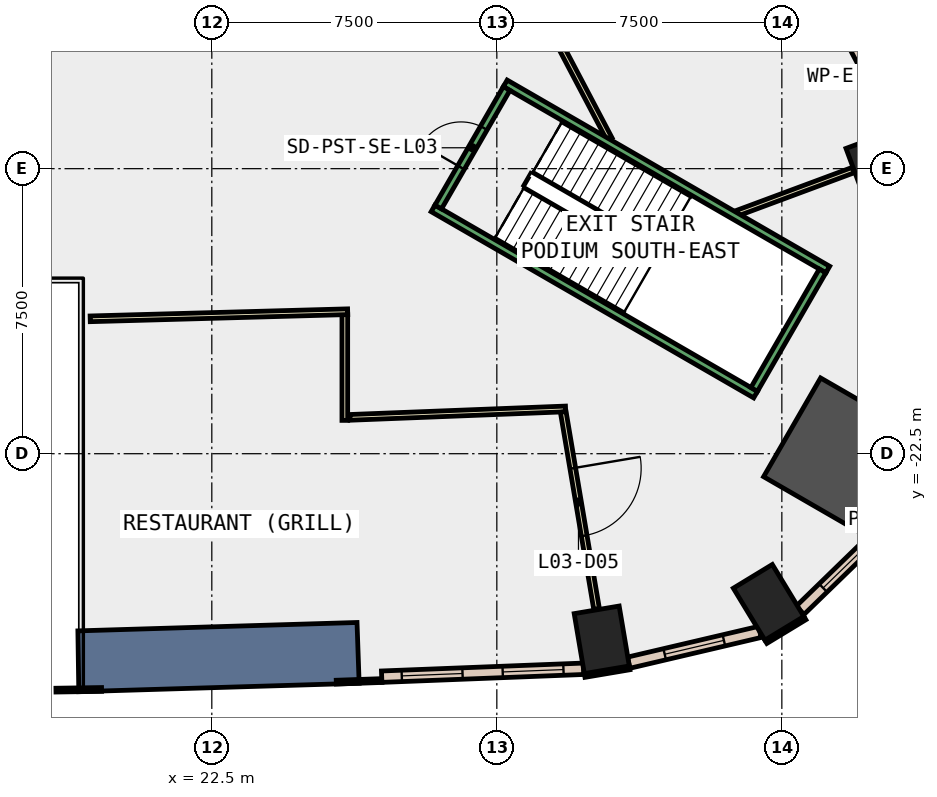
"""IFC4 building model, lengths in metres.
Left out: names, types, materials, properties, quantities, classifications, styles, units other than length and angle.
Written with IfcOpenShell. Run it as: python <this file> out.ifc"""

import sys

from ifc_helpers import new_model, si_unit, direction, frame, frame_2d, origin, origin_2d, place, context, subcontext, project, spatial, polyline, rectangle, outline, extrude, element, fill, save


model = new_model("IFC4")
c1 = context("Model", 3, precision=1e-05, world=origin(), true_north=direction((0.0, 1.0)))
c2 = subcontext(c1, "Body", "Model", "MODEL_VIEW")
j1 = project(units=[si_unit("LENGTHUNIT", "METRE"), si_unit("PLANEANGLEUNIT", "RADIAN")], contexts=[c1])
p1 = place(None, origin())
s1 = spatial("IfcSite", under=j1, at=p1, CompositionType="ELEMENT")
p2 = place(p1, origin())
s2 = spatial("IfcBuilding", under=s1, at=p2, CompositionType="ELEMENT")
p3 = place(p2, frame((0.0, 0.0, 20.0)))
s3 = spatial("IfcBuildingStorey", under=s2, at=p3, CompositionType="ELEMENT", Elevation=20.0)
for number, where, z_axis, x_axis in (
    (1, (32.761, -27.397, -0.45), (0.0, 0.0, 1.0), (0.986, 0.167, 0.0)),
    (2, (37.152, -26.411, -0.45), (0.0, 0.0, 1.0), (0.855, 0.519, 0.0)),
):
    element("IfcColumn", number, at=place(p3, frame(where, z_axis=z_axis, x_axis=x_axis)), inside=s3, PredefinedType="COLUMN", context=c2, shape_type="SweptSolid", body=[
        extrude(rectangle(XDim=1.2, YDim=1.6, at=origin_2d()), origin(), (0.0, 0.0, 1.0), 5.0),
    ])
p4 = place(p3, frame((39.069, -22.556, -0.45), z_axis=(0.0, 0.0, 1.0), x_axis=(-0.866025403784, 0.5, 0.0)))
e3 = element("IfcColumn", 3, at=p4, inside=s3, PredefinedType="COLUMN", context=c2, shape_type="SweptSolid", body=[
    extrude(rectangle(XDim=3.0, YDim=3.0, at=origin_2d()), origin(), (0.0, 0.0, 1.0), 5.0),
])
p5 = place(p3, frame((40.147, -14.751, -0.45), z_axis=(0.0, 0.0, 1.0), x_axis=(-0.348277574304, 0.937391450375, 0.0)))
e4 = element("IfcColumn", 4, at=p5, inside=s3, PredefinedType="COLUMN", context=c2, shape_type="SweptSolid", body=[
    extrude(rectangle(XDim=1.2, YDim=1.6, at=origin_2d()), origin(), (0.0, 0.0, 1.0), 5.0),
])
p6 = place(p3, frame((0.0, 0.0, -0.45)))
e5 = element("IfcWall", 5, at=p6, inside=s3, PredefinedType="SHEAR", context=c2, shape_type="SweptSolid", body=[
    extrude(outline(polyline([(19.0, -28.762), (26.377, -28.54), (26.321, -26.941), (18.976, -27.162), (19.0, -28.762)])), origin(), (0.0, 0.0, 1.0), 5.0),
])
p7 = place(p3, frame((18.399, -28.721, 0.0), z_axis=(0.0, 0.0, 1.0), x_axis=(0.999886724523, 0.015051183404, 0.0)))
e6 = element("IfcWall", 6, at=p7, inside=s3, PredefinedType="STANDARD", context=c2, shape_type="SweptSolid", body=[
    extrude(rectangle(XDim=1.2, YDim=0.1, at=frame_2d((0.6, 0.0))), origin(), (0.0, 0.0, 1.0), 4.55),
])
p8 = place(p3, frame((25.776, -28.511, 0.0), z_axis=(0.0, 0.0, 1.0), x_axis=(0.999387493042, 0.034994838926, 0.0)))
e7 = element("IfcWall", 7, at=p8, inside=s3, PredefinedType="STANDARD", context=c2, shape_type="SweptSolid", body=[
    extrude(rectangle(XDim=1.2, YDim=0.1, at=frame_2d((0.6, 0.0))), origin(), (0.0, 0.0, 1.0), 4.55),
])
p9 = place(p3, frame((32.311, -28.335, 0.0), z_axis=(0.0, 0.0, 1.0), x_axis=(0.986011774526, 0.166675674579, 0.0)))
e8 = element("IfcWall", 8, at=p9, inside=s3, PredefinedType="STANDARD", context=c2, shape_type="SweptSolid", body=[
    extrude(rectangle(XDim=1.2, YDim=0.1, at=frame_2d((0.6, 0.0))), origin(), (0.0, 0.0, 1.0), 4.55),
])
p10 = place(p3, frame((37.08, -27.449, 0.0), z_axis=(0.0, 0.0, 1.0), x_axis=(0.854716608594, 0.519094903649, 0.0)))
e9 = element("IfcWall", 9, at=p10, inside=s3, PredefinedType="STANDARD", context=c2, shape_type="SweptSolid", body=[
    extrude(rectangle(XDim=1.2, YDim=0.1, at=frame_2d((0.6, 0.0))), origin(), (0.0, 0.0, 1.0), 4.55),
])
p11 = place(p3, frame((26.97, -28.367, 0.0), z_axis=(0.0, 0.0, 1.0), x_axis=(0.999234205654, 0.039128023863, 0.0)))
e10 = element("IfcWall", 10, at=p11, inside=s3, PredefinedType="STANDARD", context=c2, shape_type="SweptSolid", body=[
    extrude(rectangle(XDim=5.316, YDim=0.3, at=frame_2d((2.658, 0.0))), origin(), (0.0, 0.0, 1.0), 4.55),
])
p12 = place(p11, frame((0.529, 0.0, 1.0)))
e11 = element("IfcOpeningElement", 11, at=p12, cuts=e10, PredefinedType="OPENING", context=c2, shape_type="SweptSolid", body=[
    extrude(rectangle(XDim=1.6, YDim=3.2, at=frame_2d((0.8, 1.6))), frame((0.0, 0.16, 0.0), z_axis=(0.0, -1.0, 0.0), x_axis=(1.0, 0.0, 0.0)), (0.0, 0.0, 1.0), 0.32),
])
p13 = place(p11, frame((3.187, 0.0, 1.0)))
e12 = element("IfcOpeningElement", 12, at=p13, cuts=e10, PredefinedType="OPENING", context=c2, shape_type="SweptSolid", body=[
    extrude(rectangle(XDim=1.6, YDim=3.2, at=frame_2d((0.8, 1.6))), frame((0.0, 0.16, 0.0), z_axis=(0.0, -1.0, 0.0), x_axis=(1.0, 0.0, 0.0)), (0.0, 0.0, 1.0), 0.32),
])
p14 = place(p3, frame((33.47, -27.999, 0.0), z_axis=(0.0, 0.0, 1.0), x_axis=(0.97357041301, 0.228387063799, 0.0)))
e13 = element("IfcWall", 13, at=p14, inside=s3, PredefinedType="STANDARD", context=c2, shape_type="SweptSolid", body=[
    extrude(rectangle(XDim=3.547, YDim=0.3, at=frame_2d((1.773, 0.0))), origin(), (0.0, 0.0, 1.0), 4.55),
])
p15 = place(p14, frame((0.973, 0.0, 1.0)))
e14 = element("IfcOpeningElement", 14, at=p15, cuts=e13, PredefinedType="OPENING", context=c2, shape_type="SweptSolid", body=[
    extrude(rectangle(XDim=1.6, YDim=3.2, at=frame_2d((0.8, 1.6))), frame((0.0, 0.16, 0.0), z_axis=(0.0, -1.0, 0.0), x_axis=(1.0, 0.0, 0.0)), (0.0, 0.0, 1.0), 0.32),
])
p16 = place(p3, frame((37.98, -26.621, 0.0), z_axis=(0.0, 0.0, 1.0), x_axis=(0.717527250225, 0.696530433782, 0.0)))
e15 = element("IfcWall", 15, at=p16, inside=s3, PredefinedType="STANDARD", context=c2, shape_type="SweptSolid", body=[
    extrude(rectangle(XDim=3.291, YDim=0.3, at=frame_2d((1.645, 0.0))), origin(), (0.0, 0.0, 1.0), 4.55),
])
p17 = place(p16, frame((0.845, 0.0, 1.0)))
e16 = element("IfcOpeningElement", 16, at=p17, cuts=e15, PredefinedType="OPENING", context=c2, shape_type="SweptSolid", body=[
    extrude(rectangle(XDim=1.6, YDim=3.2, at=frame_2d((0.8, 1.6))), frame((0.0, 0.16, 0.0), z_axis=(0.0, -1.0, 0.0), x_axis=(1.0, 0.0, 0.0)), (0.0, 0.0, 1.0), 0.32),
])
p18 = place(p3, frame((40.568, -13.956, 0.0), z_axis=(0.0, 0.0, 1.0), x_axis=(-0.466125129602, 0.884718804792, 0.0)))
e17 = element("IfcWall", 17, at=p18, inside=s3, PredefinedType="STANDARD", context=c2, shape_type="SweptSolid", body=[
    extrude(rectangle(XDim=6.164, YDim=0.3, at=frame_2d((3.082, 0.0))), origin(), (0.0, 0.0, 1.0), 4.55),
])
p19 = place(p18, frame((0.541, 0.0, 1.0)))
e18 = element("IfcOpeningElement", 18, at=p19, cuts=e17, PredefinedType="OPENING", context=c2, shape_type="SweptSolid", body=[
    extrude(rectangle(XDim=2.0, YDim=3.2, at=frame_2d((1.0, 1.6))), frame((0.0, 0.16, 0.0), z_axis=(0.0, -1.0, 0.0), x_axis=(1.0, 0.0, 0.0)), (0.0, 0.0, 1.0), 0.32),
])
p20 = place(p18, frame((3.623, 0.0, 1.0)))
e19 = element("IfcOpeningElement", 19, at=p20, cuts=e17, PredefinedType="OPENING", context=c2, shape_type="SweptSolid", body=[
    extrude(rectangle(XDim=2.0, YDim=3.2, at=frame_2d((1.0, 1.6))), frame((0.0, 0.16, 0.0), z_axis=(0.0, -1.0, 0.0), x_axis=(1.0, 0.0, 0.0)), (0.0, 0.0, 1.0), 0.32),
])
p21 = place(p3, frame((26.0, -18.841, 0.0), z_axis=(0.0, 0.0, 1.0), x_axis=(0.0, -1.0, 0.0)))
e20 = element("IfcWall", 20, at=p21, inside=s3, PredefinedType="PARTITIONING", context=c2, shape_type="SweptSolid", body=[
    extrude(rectangle(XDim=2.782, YDim=0.15, at=frame_2d((1.391, 0.0))), origin(), (0.0, 0.0, 1.0), 4.55),
])
p22 = place(p3, frame((26.135, -21.544, 0.0), z_axis=(0.0, 0.0, 1.0), x_axis=(0.999236005504, 0.039082033002, 0.0)))
e21 = element("IfcWall", 21, at=p22, inside=s3, PredefinedType="PARTITIONING", context=c2, shape_type="SweptSolid", body=[
    extrude(rectangle(XDim=5.678, YDim=0.15, at=frame_2d((2.839, 0.0))), origin(), (0.0, 0.0, 1.0), 4.55),
])
p23 = place(p3, frame((31.747, -21.399, 0.0), z_axis=(0.0, 0.0, 1.0), x_axis=(0.166820836651, -0.985987225302, 0.0)))
e22 = element("IfcWall", 22, at=p23, inside=s3, PredefinedType="PARTITIONING", context=c2, shape_type="SweptSolid", body=[
    extrude(rectangle(XDim=5.263, YDim=0.15, at=frame_2d((2.631, 0.0))), origin(), (0.0, 0.0, 1.0), 4.55),
])
p24 = place(p23, frame((1.505, 0.0, 0.0)))
e23 = element("IfcOpeningElement", 23, at=p24, cuts=e22, PredefinedType="OPENING", context=c2, shape_type="SweptSolid", body=[
    extrude(rectangle(XDim=1.8, YDim=2.1, at=frame_2d((0.9, 1.05))), frame((0.0, 0.085, 0.0), z_axis=(0.0, -1.0, 0.0), x_axis=(1.0, 0.0, 0.0)), (0.0, 0.0, 1.0), 0.17),
])
p25 = place(p3, frame((19.3, -18.951, 0.0), z_axis=(0.0, 0.0, 1.0), x_axis=(0.999619238114, 0.027593093203, 0.0)))
e24 = element("IfcWall", 24, at=p25, inside=s3, PredefinedType="PARTITIONING", context=c2, shape_type="SweptSolid", body=[
    extrude(rectangle(XDim=6.778, YDim=0.15, at=frame_2d((3.389, 0.0))), origin(), (0.0, 0.0, 1.0), 4.55),
])
p26 = place(p3, frame((39.378, -15.037, 0.0), z_axis=(0.0, 0.0, 1.0), x_axis=(-0.937400028274, -0.348254485961, 0.0)))
e25 = element("IfcWall", 25, at=p26, inside=s3, PredefinedType="PARTITIONING", context=c2, shape_type="SweptSolid", body=[
    extrude(rectangle(XDim=3.247, YDim=0.15, at=frame_2d((1.624, 0.0))), origin(), (0.0, 0.0, 1.0), 4.55),
])
p27 = place(p3, frame((32.965, -14.223, 0.0), z_axis=(0.0, 0.0, 1.0), x_axis=(-0.465955257404, 0.884808283244, 0.0)))
e26 = element("IfcWall", 26, at=p27, inside=s3, PredefinedType="PARTITIONING", context=c2, shape_type="SweptSolid", body=[
    extrude(rectangle(XDim=3.421, YDim=0.15, at=frame_2d((1.71, 0.0))), origin(), (0.0, 0.0, 1.0), 4.55),
])
for number, where, z_axis, x_axis in (
    (27, (28.322, -16.045, 0.0), (0.0, 0.0, 1.0), (0.866, -0.5, 0.0)),
    (28, (30.222, -12.755, 0.0), (0.0, 0.0, 1.0), (0.866, -0.5, 0.0)),
):
    element("IfcWall", number, at=place(p3, frame(where, z_axis=z_axis, x_axis=x_axis)), inside=s3, PredefinedType="STANDARD", context=c2, shape_type="SweptSolid", body=[
        extrude(rectangle(XDim=9.8, YDim=0.2, at=frame_2d((4.9, 0.0))), origin(), (0.0, 0.0, 1.0), 4.55),
    ])
p28 = place(p3, frame((28.458, -16.009, 0.0), z_axis=(0.0, 0.0, 1.0), x_axis=(0.499982693035, 0.866035395735, 0.0)))
e29 = element("IfcWall", 29, at=p28, inside=s3, PredefinedType="STANDARD", context=c2, shape_type="SweptSolid", body=[
    extrude(rectangle(XDim=3.6, YDim=0.2, at=frame_2d((1.8, 0.0))), origin(), (0.0, 0.0, 1.0), 4.55),
])
p29 = place(p28, frame((1.2, 0.0, 0.0)))
e30 = element("IfcOpeningElement", 30, at=p29, cuts=e29, PredefinedType="OPENING", context=c2, shape_type="SweptSolid", body=[
    extrude(rectangle(XDim=1.2, YDim=2.2, at=frame_2d((0.6, 1.1))), frame((0.0, 0.11, 0.0), z_axis=(0.0, -1.0, 0.0), x_axis=(1.0, 0.0, 0.0)), (0.0, 0.0, 1.0), 0.22),
])
p30 = place(p3, frame((36.772, -20.809, 0.0), z_axis=(0.0, 0.0, 1.0), x_axis=(0.49995333141, 0.866052346231, 0.0)))
e31 = element("IfcWall", 31, at=p30, inside=s3, PredefinedType="STANDARD", context=c2, shape_type="SweptSolid", body=[
    extrude(rectangle(XDim=3.6, YDim=0.2, at=frame_2d((1.8, 0.0))), origin(), (0.0, 0.0, 1.0), 4.55),
])
p31 = place(p12, origin())
e32 = element("IfcWindow", 32, at=p31, inside=s3, PartitioningType="SINGLE_PANEL", PredefinedType="WINDOW", context=c2, shape_type="SweptSolid", body=[
    extrude(rectangle(XDim=1.6, YDim=3.2, at=frame_2d((0.8, 1.6))), frame((0.0, 0.03, 0.0), z_axis=(0.0, -1.0, 0.0), x_axis=(1.0, 0.0, 0.0)), (0.0, 0.0, 1.0), 0.06),
])
fill(e11, e32)
p32 = place(p13, origin())
e33 = element("IfcWindow", 33, at=p32, inside=s3, PartitioningType="SINGLE_PANEL", PredefinedType="WINDOW", context=c2, shape_type="SweptSolid", body=[
    extrude(rectangle(XDim=1.6, YDim=3.2, at=frame_2d((0.8, 1.6))), frame((0.0, 0.03, 0.0), z_axis=(0.0, -1.0, 0.0), x_axis=(1.0, 0.0, 0.0)), (0.0, 0.0, 1.0), 0.06),
])
fill(e12, e33)
p33 = place(p15, origin())
e34 = element("IfcWindow", 34, at=p33, inside=s3, PartitioningType="SINGLE_PANEL", PredefinedType="WINDOW", context=c2, shape_type="SweptSolid", body=[
    extrude(rectangle(XDim=1.6, YDim=3.2, at=frame_2d((0.8, 1.6))), frame((0.0, 0.03, 0.0), z_axis=(0.0, -1.0, 0.0), x_axis=(1.0, 0.0, 0.0)), (0.0, 0.0, 1.0), 0.06),
])
fill(e14, e34)
p34 = place(p17, origin())
e35 = element("IfcWindow", 35, at=p34, inside=s3, PartitioningType="SINGLE_PANEL", PredefinedType="WINDOW", context=c2, shape_type="SweptSolid", body=[
    extrude(rectangle(XDim=1.6, YDim=3.2, at=frame_2d((0.8, 1.6))), frame((0.0, 0.03, 0.0), z_axis=(0.0, -1.0, 0.0), x_axis=(1.0, 0.0, 0.0)), (0.0, 0.0, 1.0), 0.06),
])
fill(e16, e35)
p35 = place(p19, origin())
e36 = element("IfcWindow", 36, at=p35, inside=s3, PartitioningType="SINGLE_PANEL", PredefinedType="WINDOW", context=c2, shape_type="SweptSolid", body=[
    extrude(rectangle(XDim=2.0, YDim=3.2, at=frame_2d((1.0, 1.6))), frame((0.0, 0.03, 0.0), z_axis=(0.0, -1.0, 0.0), x_axis=(1.0, 0.0, 0.0)), (0.0, 0.0, 1.0), 0.06),
])
fill(e18, e36)
p36 = place(p24, origin())
e37 = element("IfcDoor", 37, at=p36, inside=s3, OperationType="DOUBLE_DOOR_SINGLE_SWING", PredefinedType="DOOR", context=c2, shape_type="SweptSolid", body=[
    extrude(rectangle(XDim=1.8, YDim=2.1, at=frame_2d((0.9, 1.05))), frame((0.0, 0.025, 0.0), z_axis=(0.0, -1.0, 0.0), x_axis=(1.0, 0.0, 0.0)), (0.0, 0.0, 1.0), 0.05),
])
fill(e23, e37)
p37 = place(p29, origin())
e38 = element("IfcDoor", 38, at=p37, inside=s3, OperationType="SINGLE_SWING_LEFT", PredefinedType="DOOR", context=c2, shape_type="SweptSolid", body=[
    extrude(rectangle(XDim=1.2, YDim=2.2, at=frame_2d((0.6, 1.1))), frame((0.0, 0.025, 0.0), z_axis=(0.0, -1.0, 0.0), x_axis=(1.0, 0.0, 0.0)), (0.0, 0.0, 1.0), 0.05),
])
fill(e30, e38)
save(model, sys.argv[1])
